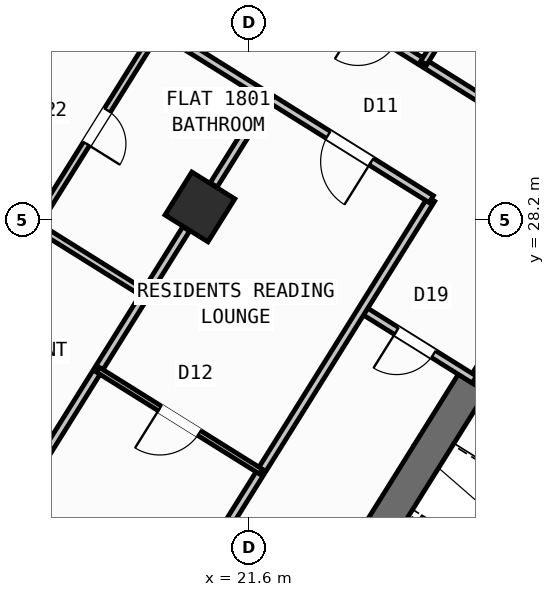
"""IFC4 building model, lengths in metres.
Left out: names, types, materials, properties, quantities, classifications, styles, units other than length and angle.
Written with IfcOpenShell. Run it as: python <this file> out.ifc"""

import sys

from ifc_helpers import new_model, si_unit, direction, frame, frame_2d, origin, origin_2d, place, context, subcontext, project, spatial, rectangle, hollow_rectangle, extrude, source, transform, mapped, element, fill, save


model = new_model("IFC4")
c1 = context("Model", 3, precision=1e-05, world=origin(), true_north=direction((0.0, 1.0)))
c2 = subcontext(c1, "Body", "Model", "MODEL_VIEW")
j1 = project(units=[si_unit("LENGTHUNIT", "METRE"), si_unit("PLANEANGLEUNIT", "RADIAN")], contexts=[c1])
p1 = place(None, origin())
s1 = spatial("IfcSite", under=j1, at=p1, CompositionType="ELEMENT")
p2 = place(p1, origin())
s2 = spatial("IfcBuilding", under=s1, at=p2, CompositionType="ELEMENT")
p3 = place(p2, frame((0.0, 0.0, 71.7)))
s3 = spatial("IfcBuildingStorey", under=s2, at=p3, CompositionType="ELEMENT", Elevation=71.7)
p4 = place(p3, frame((26.007, 24.976, 0.0), z_axis=(0.0, 0.0, 1.0), x_axis=(-0.529916319127, -0.848049936456, 0.0)))
e1 = element("IfcWall", 1, at=p4, inside=s3, PredefinedType="SHEAR", context=c2, shape_type="SweptSolid", body=[
    extrude(rectangle(XDim=6.375, YDim=0.65, at=frame_2d((3.188, 0.0))), origin(), (0.0, 0.0, 1.0), 4.52),
])
m1 = source(origin(), c2, "Body", "SweptSolid", [
    extrude(hollow_rectangle(XDim=1.0, YDim=1.0, WallThickness=0.04, at=origin_2d()), origin(), (0.0, 0.0, 1.0), 4.8),
])
p5 = place(p3, frame((20.632, 28.452, 0.0), z_axis=(0.0, 0.0, 1.0), x_axis=(-0.848048096156, 0.529919264233, 0.0)))
e2 = element("IfcColumn", 2, at=p5, inside=s3, PredefinedType="COLUMN", context=c2, shape_type="MappedRepresentation", body=[
    mapped(m1, transform((0.0, 0.0, 0.0), scale=1.0)),
])
p6 = place(p3, frame((31.76, 12.183, 0.0), z_axis=(0.0, 0.0, 1.0), x_axis=(-0.848047074256, 0.529920899612, 0.0)))
e3 = element("IfcWall", 3, at=p6, inside=s3, PredefinedType="STANDARD", context=c2, shape_type="SweptSolid", body=[
    extrude(rectangle(XDim=30.652, YDim=0.32, at=frame_2d((15.326, 0.0))), origin(), (0.0, 0.0, 1.0), 4.52),
])
p7 = place(p6, frame((20.241, 0.0, 0.0)))
e4 = element("IfcOpeningElement", 4, at=p7, cuts=e3, PredefinedType="OPENING", context=c2, shape_type="SweptSolid", body=[
    extrude(rectangle(XDim=1.2, YDim=2.15, at=frame_2d((0.6, 1.075))), frame((0.0, 0.17, 0.0), z_axis=(0.0, -1.0, 0.0), x_axis=(1.0, 0.0, 0.0)), (0.0, 0.0, 1.0), 0.34),
])
p8 = place(p6, frame((14.781, 0.0, 0.0)))
e5 = element("IfcOpeningElement", 5, at=p8, cuts=e3, PredefinedType="OPENING", context=c2, shape_type="SweptSolid", body=[
    extrude(rectangle(XDim=1.5, YDim=2.25, at=frame_2d((0.75, 1.125))), frame((0.0, 0.17, 0.0), z_axis=(0.0, -1.0, 0.0), x_axis=(1.0, 0.0, 0.0)), (0.0, 0.0, 1.0), 0.34),
])
p9 = place(p6, frame((1.84, 0.0, 0.75)))
e6 = element("IfcOpeningElement", 6, at=p9, cuts=e3, PredefinedType="OPENING", context=c2, shape_type="SweptSolid", body=[
    extrude(rectangle(XDim=2.4, YDim=1.6, at=frame_2d((1.2, 0.8))), frame((0.0, 0.17, 0.0), z_axis=(0.0, -1.0, 0.0), x_axis=(1.0, 0.0, 0.0)), (0.0, 0.0, 1.0), 0.34),
])
p10 = place(p6, frame((7.019, 0.0, 0.75)))
e7 = element("IfcOpeningElement", 7, at=p10, cuts=e3, PredefinedType="OPENING", context=c2, shape_type="SweptSolid", body=[
    extrude(rectangle(XDim=2.4, YDim=1.6, at=frame_2d((1.2, 0.8))), frame((0.0, 0.17, 0.0), z_axis=(0.0, -1.0, 0.0), x_axis=(1.0, 0.0, 0.0)), (0.0, 0.0, 1.0), 0.34),
])
p11 = place(p6, frame((25.841, 0.0, 0.95)))
e8 = element("IfcOpeningElement", 8, at=p11, cuts=e3, PredefinedType="OPENING", context=c2, shape_type="SweptSolid", body=[
    extrude(rectangle(XDim=1.2, YDim=1.4, at=frame_2d((0.6, 0.7))), frame((0.0, 0.17, 0.0), z_axis=(0.0, -1.0, 0.0), x_axis=(1.0, 0.0, 0.0)), (0.0, 0.0, 1.0), 0.34),
])
p12 = place(p3, frame((17.424, 47.083, 0.0), z_axis=(0.0, 0.0, 1.0), x_axis=(0.848049927979, -0.529916332693, 0.0)))
e9 = element("IfcWall", 9, at=p12, inside=s3, PredefinedType="STANDARD", context=c2, shape_type="SweptSolid", body=[
    extrude(rectangle(XDim=29.223, YDim=0.32, at=frame_2d((14.612, 0.0))), origin(), (0.0, 0.0, 1.0), 4.52),
])
p13 = place(p12, frame((3.339, 0.0, 0.0)))
e10 = element("IfcOpeningElement", 10, at=p13, cuts=e9, PredefinedType="OPENING", context=c2, shape_type="SweptSolid", body=[
    extrude(rectangle(XDim=1.05, YDim=2.15, at=frame_2d((0.525, 1.075))), frame((0.0, 0.17, 0.0), z_axis=(0.0, -1.0, 0.0), x_axis=(1.0, 0.0, 0.0)), (0.0, 0.0, 1.0), 0.34),
])
p14 = place(p12, frame((8.194, 0.0, 0.75)))
e11 = element("IfcOpeningElement", 11, at=p14, cuts=e9, PredefinedType="OPENING", context=c2, shape_type="SweptSolid", body=[
    extrude(rectangle(XDim=2.4, YDim=1.6, at=frame_2d((1.2, 0.8))), frame((0.0, 0.17, 0.0), z_axis=(0.0, -1.0, 0.0), x_axis=(1.0, 0.0, 0.0)), (0.0, 0.0, 1.0), 0.34),
])
p15 = place(p12, frame((22.226, 0.0, 0.85)))
e12 = element("IfcOpeningElement", 12, at=p15, cuts=e9, PredefinedType="OPENING", context=c2, shape_type="SweptSolid", body=[
    extrude(rectangle(XDim=1.8, YDim=1.5, at=frame_2d((0.9, 0.75))), frame((0.0, 0.17, 0.0), z_axis=(0.0, -1.0, 0.0), x_axis=(1.0, 0.0, 0.0)), (0.0, 0.0, 1.0), 0.34),
])
p16 = place(p12, frame((26.934, 0.0, 0.95)))
e13 = element("IfcOpeningElement", 13, at=p16, cuts=e9, PredefinedType="OPENING", context=c2, shape_type="SweptSolid", body=[
    extrude(rectangle(XDim=1.2, YDim=1.4, at=frame_2d((0.6, 0.7))), frame((0.0, 0.17, 0.0), z_axis=(0.0, -1.0, 0.0), x_axis=(1.0, 0.0, 0.0)), (0.0, 0.0, 1.0), 0.34),
])
p17 = place(p12, frame((14.636, 0.0, 1.0)))
e14 = element("IfcOpeningElement", 14, at=p17, cuts=e9, PredefinedType="OPENING", context=c2, shape_type="SweptSolid", body=[
    extrude(rectangle(XDim=0.9, YDim=1.25, at=frame_2d((0.45, 0.625))), frame((0.0, 0.17, 0.0), z_axis=(0.0, -1.0, 0.0), x_axis=(1.0, 0.0, 0.0)), (0.0, 0.0, 1.0), 0.34),
])
p18 = place(p3, frame((31.28, 18.261, 0.0), z_axis=(0.0, 0.0, 1.0), x_axis=(-0.848051618787, 0.529913626805, 0.0)))
e15 = element("IfcWall", 15, at=p18, inside=s3, PredefinedType="SHEAR", context=c2, shape_type="SweptSolid", body=[
    extrude(rectangle(XDim=7.46, YDim=0.26, at=frame_2d((3.73, 0.0))), origin(), (0.0, 0.0, 1.0), 4.52),
])
p19 = place(p18, frame((0.36, 0.0, 0.0)))
e16 = element("IfcOpeningElement", 16, at=p19, cuts=e15, PredefinedType="OPENING", context=c2, shape_type="SweptSolid", body=[
    extrude(rectangle(XDim=0.86, YDim=2.05, at=frame_2d((0.43, 1.025))), frame((0.0, 0.14, 0.0), z_axis=(0.0, -1.0, 0.0), x_axis=(1.0, 0.0, 0.0)), (0.0, 0.0, 1.0), 0.28),
])
p20 = place(p3, frame((27.596, 27.52, 0.0), z_axis=(0.0, 0.0, 1.0), x_axis=(-0.529865479138, -0.848081702443, 0.0)))
e17 = element("IfcWall", 17, at=p20, inside=s3, PredefinedType="STANDARD", context=c2, shape_type="SweptSolid", body=[
    extrude(rectangle(XDim=2.96, YDim=0.2, at=frame_2d((1.48, 0.0))), origin(), (0.0, 0.0, 1.0), 4.51),
])
p21 = place(p20, frame((1.76, 0.0, 0.0)))
e18 = element("IfcOpeningElement", 18, at=p21, cuts=e17, PredefinedType="OPENING", context=c2, shape_type="SweptSolid", body=[
    extrude(rectangle(XDim=0.86, YDim=2.05, at=frame_2d((0.43, 1.025))), frame((0.0, 0.11, 0.0), z_axis=(0.0, -1.0, 0.0), x_axis=(1.0, 0.0, 0.0)), (0.0, 0.0, 1.0), 0.22),
])
p22 = place(p3, frame((26.049, 25.044, 0.0), z_axis=(0.0, 0.0, 1.0), x_axis=(-0.848050851465, 0.529914854792, 0.0)))
e19 = element("IfcWall", 19, at=p22, inside=s3, PredefinedType="PARTITIONING", context=c2, shape_type="SweptSolid", body=[
    extrude(rectangle(XDim=2.61, YDim=0.16, at=frame_2d((1.305, 0.0))), origin(), (0.0, 0.0, 1.0), 3.895),
])
p23 = place(p22, frame((0.95, 0.0, 0.0)))
e20 = element("IfcOpeningElement", 20, at=p23, cuts=e19, PredefinedType="OPENING", context=c2, shape_type="SweptSolid", body=[
    extrude(rectangle(XDim=0.86, YDim=2.05, at=frame_2d((0.43, 1.025))), frame((0.0, 0.09, 0.0), z_axis=(0.0, -1.0, 0.0), x_axis=(1.0, 0.0, 0.0)), (0.0, 0.0, 1.0), 0.18),
])
p24 = place(p3, frame((25.198, 28.606, 0.0), z_axis=(0.0, 0.0, 1.0), x_axis=(-0.529926497642, -0.848043576178, 0.0)))
e21 = element("IfcWall", 21, at=p24, inside=s3, PredefinedType="PARTITIONING", context=c2, shape_type="SweptSolid", body=[
    extrude(rectangle(XDim=10.3, YDim=0.16, at=frame_2d((5.15, 0.0))), origin(), (0.0, 0.0, 1.0), 4.51),
])
p25 = place(p3, frame((26.363, 30.472, 0.0), z_axis=(0.0, 0.0, 1.0), x_axis=(-0.848052408131, 0.529912363569, 0.0)))
e22 = element("IfcWall", 22, at=p25, inside=s3, PredefinedType="PARTITIONING", context=c2, shape_type="SweptSolid", body=[
    extrude(rectangle(XDim=16.73, YDim=0.16, at=frame_2d((8.365, 0.0))), origin(), (0.0, 0.0, 1.0), 4.51),
])
p26 = place(p25, frame((2.22, 0.0, 0.0)))
e23 = element("IfcOpeningElement", 23, at=p26, cuts=e22, PredefinedType="OPENING", context=c2, shape_type="SweptSolid", body=[
    extrude(rectangle(XDim=0.86, YDim=2.05, at=frame_2d((0.43, 1.025))), frame((0.0, 0.09, 0.0), z_axis=(0.0, -1.0, 0.0), x_axis=(1.0, 0.0, 0.0)), (0.0, 0.0, 1.0), 0.18),
])
p27 = place(p25, frame((7.82, 0.0, 0.0)))
e24 = element("IfcOpeningElement", 24, at=p27, cuts=e22, PredefinedType="OPENING", context=c2, shape_type="SweptSolid", body=[
    extrude(rectangle(XDim=1.0, YDim=2.1, at=frame_2d((0.5, 1.05))), frame((0.0, 0.09, 0.0), z_axis=(0.0, -1.0, 0.0), x_axis=(1.0, 0.0, 0.0)), (0.0, 0.0, 1.0), 0.18),
])
p28 = place(p25, frame((12.95, 0.0, 0.0)))
e25 = element("IfcOpeningElement", 25, at=p28, cuts=e22, PredefinedType="OPENING", context=c2, shape_type="SweptSolid", body=[
    extrude(rectangle(XDim=1.0, YDim=2.1, at=frame_2d((0.5, 1.05))), frame((0.0, 0.09, 0.0), z_axis=(0.0, -1.0, 0.0), x_axis=(1.0, 0.0, 0.0)), (0.0, 0.0, 1.0), 0.18),
])
p29 = place(p3, frame((25.198, 28.606, 0.0), z_axis=(0.0, 0.0, 1.0), x_axis=(-0.848052408131, 0.529912363569, 0.0)))
e26 = element("IfcWall", 26, at=p29, inside=s3, PredefinedType="PARTITIONING", context=c2, shape_type="SweptSolid", body=[
    extrude(rectangle(XDim=16.73, YDim=0.16, at=frame_2d((8.365, 0.0))), origin(), (0.0, 0.0, 1.0), 4.51),
])
p30 = place(p29, frame((1.395, 0.0, 0.0)))
e27 = element("IfcOpeningElement", 27, at=p30, cuts=e26, PredefinedType="OPENING", context=c2, shape_type="SweptSolid", body=[
    extrude(rectangle(XDim=1.0, YDim=2.1, at=frame_2d((0.5, 1.05))), frame((0.0, 0.09, 0.0), z_axis=(0.0, -1.0, 0.0), x_axis=(1.0, 0.0, 0.0)), (0.0, 0.0, 1.0), 0.18),
])
p31 = place(p29, frame((7.82, 0.0, 0.0)))
e28 = element("IfcOpeningElement", 28, at=p31, cuts=e26, PredefinedType="OPENING", context=c2, shape_type="SweptSolid", body=[
    extrude(rectangle(XDim=1.0, YDim=2.1, at=frame_2d((0.5, 1.05))), frame((0.0, 0.09, 0.0), z_axis=(0.0, -1.0, 0.0), x_axis=(1.0, 0.0, 0.0)), (0.0, 0.0, 1.0), 0.18),
])
p32 = place(p29, frame((14.76, 0.0, 0.0)))
e29 = element("IfcOpeningElement", 29, at=p32, cuts=e26, PredefinedType="OPENING", context=c2, shape_type="SweptSolid", body=[
    extrude(rectangle(XDim=1.0, YDim=2.1, at=frame_2d((0.5, 1.05))), frame((0.0, 0.09, 0.0), z_axis=(0.0, -1.0, 0.0), x_axis=(1.0, 0.0, 0.0)), (0.0, 0.0, 1.0), 0.18),
])
p33 = place(p3, frame((21.983, 30.615, 0.0), z_axis=(0.0, 0.0, 1.0), x_axis=(-0.529966635742, -0.848018493313, 0.0)))
e30 = element("IfcWall", 30, at=p33, inside=s3, PredefinedType="PARTITIONING", context=c2, shape_type="SweptSolid", body=[
    extrude(rectangle(XDim=2.038, YDim=0.16, at=frame_2d((1.019, 0.0))), origin(), (0.0, 0.0, 1.0), 3.895),
])
p34 = place(p3, frame((20.361, 28.018, 0.0), z_axis=(0.0, 0.0, 1.0), x_axis=(-0.529915015264, -0.848050751193, 0.0)))
e31 = element("IfcWall", 31, at=p34, inside=s3, PredefinedType="PARTITIONING", context=c2, shape_type="SweptSolid", body=[
    extrude(rectangle(XDim=6.276, YDim=0.16, at=frame_2d((3.138, 0.0))), origin(), (0.0, 0.0, 1.0), 3.895),
])
p35 = place(p3, frame((21.837, 23.228, 0.0), z_axis=(0.0, 0.0, 1.0), x_axis=(-0.84803087207, 0.529946827537, 0.0)))
e32 = element("IfcWall", 32, at=p35, inside=s3, PredefinedType="PARTITIONING", context=c2, shape_type="SweptSolid", body=[
    extrude(rectangle(XDim=3.79, YDim=0.11, at=frame_2d((1.895, 0.0))), origin(), (0.0, 0.0, 1.0), 4.51),
])
p36 = place(p35, frame((1.435, 0.0, 0.0)))
e33 = element("IfcOpeningElement", 33, at=p36, cuts=e32, PredefinedType="OPENING", context=c2, shape_type="SweptSolid", body=[
    extrude(rectangle(XDim=0.92, YDim=2.08, at=frame_2d((0.46, 1.04))), frame((0.0, 0.065, 0.0), z_axis=(0.0, -1.0, 0.0), x_axis=(1.0, 0.0, 0.0)), (0.0, 0.0, 1.0), 0.13),
])
p37 = place(p3, frame((19.556, 26.73, 0.0), z_axis=(0.0, 0.0, 1.0), x_axis=(-0.848049732085, 0.529916646191, 0.0)))
e34 = element("IfcWall", 34, at=p37, inside=s3, PredefinedType="PLUMBINGWALL", context=c2, shape_type="SweptSolid", body=[
    extrude(rectangle(XDim=6.4, YDim=0.14, at=frame_2d((3.2, 0.0))), origin(), (0.0, 0.0, 1.0), 4.51),
])
p38 = place(p37, frame((2.824, 0.0, 0.0)))
e35 = element("IfcOpeningElement", 35, at=p38, cuts=e34, PredefinedType="OPENING", context=c2, shape_type="SweptSolid", body=[
    extrude(rectangle(XDim=0.78, YDim=2.05, at=frame_2d((0.39, 1.025))), frame((0.0, 0.08, 0.0), z_axis=(0.0, -1.0, 0.0), x_axis=(1.0, 0.0, 0.0)), (0.0, 0.0, 1.0), 0.16),
])
p39 = place(p3, frame((19.812, 31.971, 0.0), z_axis=(0.0, 0.0, 1.0), x_axis=(-0.529917480809, -0.848049210561, 0.0)))
e36 = element("IfcWall", 36, at=p39, inside=s3, PredefinedType="PLUMBINGWALL", context=c2, shape_type="SweptSolid", body=[
    extrude(rectangle(XDim=4.58, YDim=0.14, at=frame_2d((2.29, 0.0))), origin(), (0.0, 0.0, 1.0), 4.51),
])
p40 = place(p39, frame((1.9, 0.0, 0.0)))
e37 = element("IfcOpeningElement", 37, at=p40, cuts=e36, PredefinedType="OPENING", context=c2, shape_type="SweptSolid", body=[
    extrude(rectangle(XDim=0.78, YDim=2.05, at=frame_2d((0.39, 1.025))), frame((0.0, 0.08, 0.0), z_axis=(0.0, -1.0, 0.0), x_axis=(1.0, 0.0, 0.0)), (0.0, 0.0, 1.0), 0.16),
])
p41 = place(p3, frame((27.439, 35.118, 0.0), z_axis=(0.0, 0.0, 1.0), x_axis=(-0.529911350634, -0.84805304107, 0.0)))
e38 = element("IfcWall", 38, at=p41, inside=s3, PredefinedType="PLUMBINGWALL", context=c2, shape_type="SweptSolid", body=[
    extrude(rectangle(XDim=4.51, YDim=0.14, at=frame_2d((2.255, 0.0))), origin(), (0.0, 0.0, 1.0), 4.135),
])
p42 = place(p41, frame((1.865, 0.0, 0.0)))
e39 = element("IfcOpeningElement", 39, at=p42, cuts=e38, PredefinedType="OPENING", context=c2, shape_type="SweptSolid", body=[
    extrude(rectangle(XDim=0.78, YDim=2.05, at=frame_2d((0.39, 1.025))), frame((0.0, 0.08, 0.0), z_axis=(0.0, -1.0, 0.0), x_axis=(1.0, 0.0, 0.0)), (0.0, 0.0, 1.0), 0.16),
])
m2 = source(origin(), c2, "Body", "SweptSolid", [
    extrude(rectangle(XDim=0.86, YDim=2.05, at=frame_2d((0.43, 1.025))), frame((0.0, 0.025, 0.0), z_axis=(0.0, -1.0, 0.0), x_axis=(1.0, 0.0, 0.0)), (0.0, 0.0, 1.0), 0.05),
])
p43 = place(p23, origin())
e40 = element("IfcDoor", 40, at=p43, inside=s3, OperationType="SINGLE_SWING_RIGHT", PredefinedType="DOOR", context=c2, shape_type="MappedRepresentation", body=[
    mapped(m2, transform((0.0, 0.0, 0.0), scale=1.0)),
])
fill(e20, e40)
m3 = source(origin(), c2, "Body", "SweptSolid", [
    extrude(rectangle(XDim=1.0, YDim=2.1, at=frame_2d((0.5, 1.05))), frame((0.0, 0.025, 0.0), z_axis=(0.0, -1.0, 0.0), x_axis=(1.0, 0.0, 0.0)), (0.0, 0.0, 1.0), 0.05),
])
p44 = place(p30, origin())
e41 = element("IfcDoor", 41, at=p44, inside=s3, OperationType="SINGLE_SWING_LEFT", PredefinedType="DOOR", context=c2, shape_type="MappedRepresentation", body=[
    mapped(m3, transform((0.0, 0.0, 0.0), scale=1.0)),
])
fill(e27, e41)
m4 = source(origin(), c2, "Body", "SweptSolid", [
    extrude(rectangle(XDim=0.92, YDim=2.08, at=frame_2d((0.46, 1.04))), frame((0.0, 0.025, 0.0), z_axis=(0.0, -1.0, 0.0), x_axis=(1.0, 0.0, 0.0)), (0.0, 0.0, 1.0), 0.05),
])
p45 = place(p36, origin())
e42 = element("IfcDoor", 42, at=p45, inside=s3, OperationType="SINGLE_SWING_RIGHT", PredefinedType="DOOR", context=c2, shape_type="MappedRepresentation", body=[
    mapped(m4, transform((0.0, 0.0, 0.0), scale=1.0)),
])
fill(e33, e42)
m5 = source(origin(), c2, "Body", "SweptSolid", [
    extrude(rectangle(XDim=0.78, YDim=2.05, at=frame_2d((0.39, 1.025))), frame((0.0, 0.025, 0.0), z_axis=(0.0, -1.0, 0.0), x_axis=(1.0, 0.0, 0.0)), (0.0, 0.0, 1.0), 0.05),
])
p46 = place(p40, origin())
e43 = element("IfcDoor", 43, at=p46, inside=s3, OperationType="SINGLE_SWING_RIGHT", PredefinedType="DOOR", context=c2, shape_type="MappedRepresentation", body=[
    mapped(m5, transform((0.0, 0.0, 0.0), scale=1.0)),
])
fill(e37, e43)
save(model, sys.argv[1])
